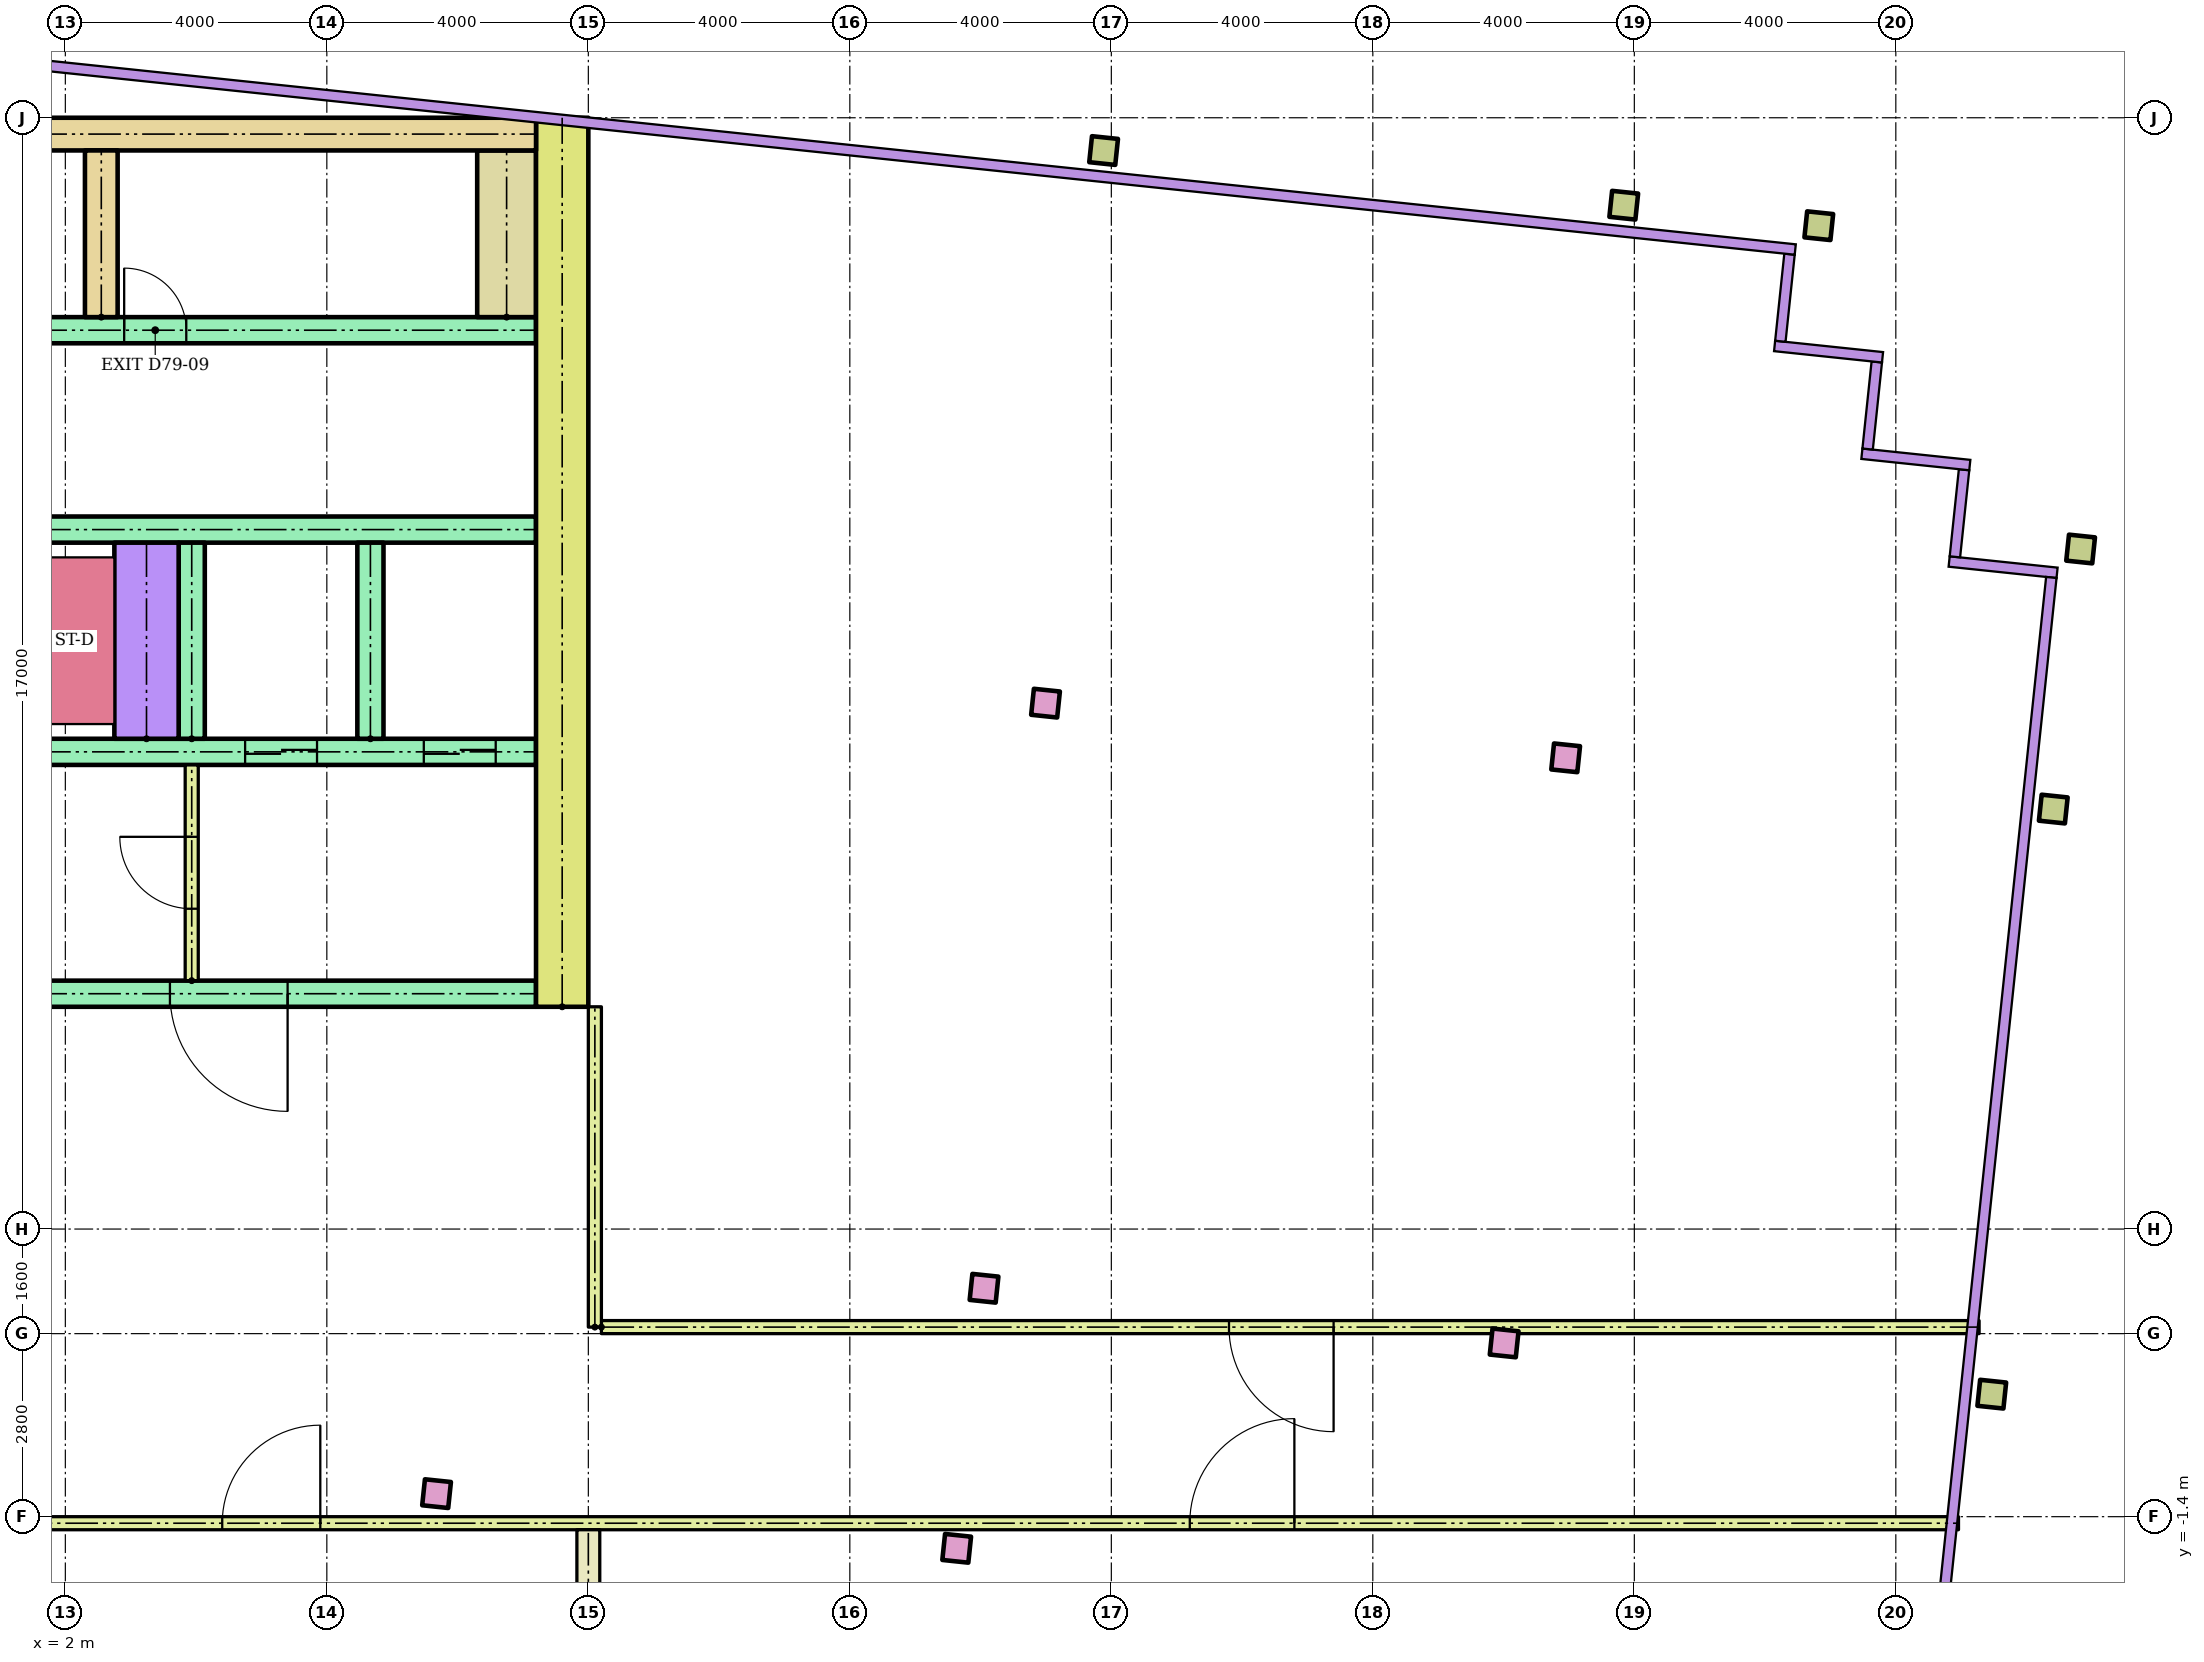
"""IFC4 building model, lengths in metres.
Left out: names, types, materials, properties, quantities, classifications, styles, units other than length and angle.
Written with IfcOpenShell. Run it as: python <this file> out.ifc"""

import sys

from ifc_helpers import new_model, si_unit, direction, frame, frame_2d, origin, origin_2d, place, context, subcontext, project, spatial, rectangle, hollow_rectangle, extrude, element, fill, save


model = new_model("IFC4")
c1 = context("Model", 3, precision=1e-05, world=origin(), true_north=direction((0.0, 1.0)))
c2 = subcontext(c1, "Body", "Model", "MODEL_VIEW")
j1 = project(units=[si_unit("LENGTHUNIT", "METRE"), si_unit("PLANEANGLEUNIT", "RADIAN")], contexts=[c1])
p1 = place(None, origin())
s1 = spatial("IfcSite", under=j1, at=p1, CompositionType="ELEMENT")
p2 = place(p1, origin())
s2 = spatial("IfcBuilding", under=s1, at=p2, CompositionType="ELEMENT")
p3 = place(p2, frame((0.0, 0.0, 309.2)))
s3 = spatial("IfcBuildingStorey", under=s2, at=p3, CompositionType="ELEMENT", Elevation=309.2)
for number, where, z_axis, x_axis in (
    (1, (7.678, -1.048, 0.0), (0.0, 0.0, 1.0), (0.995, -0.105, 0.0)),
    (2, (15.635, -1.884, 0.0), (0.0, 0.0, 1.0), (0.995, -0.105, 0.0)),
    (3, (16.053, 2.094, 0.0), (0.0, 0.0, 1.0), (0.995, -0.105, 0.0)),
    (4, (24.009, 1.258, 0.0), (0.0, 0.0, 1.0), (0.995, -0.105, 0.0)),
):
    element("IfcColumn", number, at=place(p3, frame(where, z_axis=z_axis, x_axis=x_axis)), inside=s3, PredefinedType="COLUMN", context=c2, shape_type="SweptSolid", body=[
        extrude(rectangle(XDim=0.4, YDim=0.4, at=origin_2d()), origin(), (0.0, 0.0, 1.0), 3.78),
    ])
p4 = place(p3, frame((31.468, 0.474, 0.0), z_axis=(0.0, 0.0, 1.0), x_axis=(0.994521895368, -0.104528463268, 0.0)))
e5 = element("IfcColumn", 5, at=p4, inside=s3, PredefinedType="COLUMN", context=c2, shape_type="SweptSolid", body=[
    extrude(hollow_rectangle(XDim=0.4, YDim=0.4, WallThickness=0.02, at=origin_2d()), origin(), (0.0, 0.0, 1.0), 3.78),
])
for number, where, z_axis, x_axis in (
    (6, (16.993, 11.045, 0.0), (0.0, 0.0, 1.0), (0.995, -0.105, 0.0)),
    (7, (24.95, 10.209, 0.0), (0.0, 0.0, 1.0), (0.995, -0.105, 0.0)),
):
    element("IfcColumn", number, at=place(p3, frame(where, z_axis=z_axis, x_axis=x_axis)), inside=s3, PredefinedType="COLUMN", context=c2, shape_type="SweptSolid", body=[
        extrude(rectangle(XDim=0.4, YDim=0.4, at=origin_2d()), origin(), (0.0, 0.0, 1.0), 3.78),
    ])
for number, where, z_axis, x_axis in (
    (8, (32.409, 9.425, 0.0), (0.0, 0.0, 1.0), (0.995, -0.105, 0.0)),
    (9, (32.827, 13.403, 0.0), (0.0, 0.0, 1.0), (0.995, -0.105, 0.0)),
    (10, (17.882, 19.498, 0.0), (0.0, 0.0, 1.0), (0.995, -0.105, 0.0)),
    (11, (25.838, 18.662, 0.0), (0.0, 0.0, 1.0), (0.995, -0.105, 0.0)),
    (12, (28.822, 18.349, 0.0), (0.0, 0.0, 1.0), (0.995, -0.105, 0.0)),
):
    element("IfcColumn", number, at=place(p3, frame(where, z_axis=z_axis, x_axis=x_axis)), inside=s3, PredefinedType="COLUMN", context=c2, shape_type="SweptSolid", body=[
        extrude(hollow_rectangle(XDim=0.4, YDim=0.4, WallThickness=0.02, at=origin_2d()), origin(), (0.0, 0.0, 1.0), 3.78),
    ])
p5 = place(p3, frame((9.6, 6.4, 0.0), z_axis=(0.0, 0.0, 1.0), x_axis=(0.0, 1.0, 0.0)))
e13 = element("IfcWall", 13, at=p5, inside=s3, PredefinedType="SHEAR", context=c2, shape_type="SweptSolid", body=[
    extrude(rectangle(XDim=13.6, YDim=0.8, at=frame_2d((6.8, 0.0))), origin(), (0.0, 0.0, 1.0), 3.78),
])
p6 = place(p3, frame((-9.2, 19.75, 0.0)))
e14 = element("IfcWall", 14, at=p6, inside=s3, PredefinedType="SHEAR", context=c2, shape_type="SweptSolid", body=[
    extrude(rectangle(XDim=18.4, YDim=0.5, at=frame_2d((9.2, 0.0))), origin(), (0.0, 0.0, 1.0), 3.78),
])
p7 = place(p3, frame((-9.2, 6.6, 0.0)))
e15 = element("IfcWall", 15, at=p7, inside=s3, PredefinedType="SHEAR", context=c2, shape_type="SweptSolid", body=[
    extrude(rectangle(XDim=18.4, YDim=0.4, at=frame_2d((9.2, 0.0))), origin(), (0.0, 0.0, 1.0), 3.78),
])
p8 = place(p7, frame((8.3, 0.0, 0.0)))
e16 = element("IfcOpeningElement", 16, at=p8, cuts=e15, PredefinedType="OPENING", context=c2, shape_type="SweptSolid", body=[
    extrude(rectangle(XDim=1.8, YDim=2.1, at=frame_2d((0.9, 1.05))), frame((0.0, 0.21, 0.0), z_axis=(0.0, -1.0, 0.0), x_axis=(1.0, 0.0, 0.0)), (0.0, 0.0, 1.0), 0.42),
])
p9 = place(p7, frame((3.8, 0.0, 0.0)))
e17 = element("IfcOpeningElement", 17, at=p9, cuts=e15, PredefinedType="OPENING", context=c2, shape_type="SweptSolid", body=[
    extrude(rectangle(XDim=1.8, YDim=2.1, at=frame_2d((0.9, 1.05))), frame((0.0, 0.21, 0.0), z_axis=(0.0, -1.0, 0.0), x_axis=(1.0, 0.0, 0.0)), (0.0, 0.0, 1.0), 0.42),
])
p10 = place(p7, frame((12.8, 0.0, 0.0)))
e18 = element("IfcOpeningElement", 18, at=p10, cuts=e15, PredefinedType="OPENING", context=c2, shape_type="SweptSolid", body=[
    extrude(rectangle(XDim=1.8, YDim=2.1, at=frame_2d((0.9, 1.05))), frame((0.0, 0.21, 0.0), z_axis=(0.0, -1.0, 0.0), x_axis=(1.0, 0.0, 0.0)), (0.0, 0.0, 1.0), 0.42),
])
p11 = place(p3, frame((-6.667, 10.3, 0.0)))
e19 = element("IfcWall", 19, at=p11, inside=s3, PredefinedType="SHEAR", context=c2, shape_type="SweptSolid", body=[
    extrude(rectangle(XDim=15.867, YDim=0.4, at=frame_2d((7.933, 0.0))), origin(), (0.0, 0.0, 1.0), 3.78),
])
p12 = place(p11, frame((11.417, 0.0, 0.0)))
e20 = element("IfcOpeningElement", 20, at=p12, cuts=e19, PredefinedType="OPENING", context=c2, shape_type="SweptSolid", body=[
    extrude(rectangle(XDim=1.1, YDim=2.1, at=frame_2d((0.55, 1.05))), frame((0.0, 0.21, 0.0), z_axis=(0.0, -1.0, 0.0), x_axis=(1.0, 0.0, 0.0)), (0.0, 0.0, 1.0), 0.42),
])
p13 = place(p11, frame((14.15, 0.0, 0.0)))
e21 = element("IfcOpeningElement", 21, at=p13, cuts=e19, PredefinedType="OPENING", context=c2, shape_type="SweptSolid", body=[
    extrude(rectangle(XDim=1.1, YDim=2.1, at=frame_2d((0.55, 1.05))), frame((0.0, 0.21, 0.0), z_axis=(0.0, -1.0, 0.0), x_axis=(1.0, 0.0, 0.0)), (0.0, 0.0, 1.0), 0.42),
])
p14 = place(p11, frame((0.867, 0.0, 0.0)))
e22 = element("IfcOpeningElement", 22, at=p14, cuts=e19, PredefinedType="OPENING", context=c2, shape_type="SweptSolid", body=[
    extrude(rectangle(XDim=1.0, YDim=2.1, at=frame_2d((0.5, 1.05))), frame((0.0, 0.21, 0.0), z_axis=(0.0, -1.0, 0.0), x_axis=(1.0, 0.0, 0.0)), (0.0, 0.0, 1.0), 0.42),
])
p15 = place(p11, frame((4.017, 0.0, 0.0)))
e23 = element("IfcOpeningElement", 23, at=p15, cuts=e19, PredefinedType="OPENING", context=c2, shape_type="SweptSolid", body=[
    extrude(rectangle(XDim=0.95, YDim=2.1, at=frame_2d((0.475, 1.05))), frame((0.0, 0.21, 0.0), z_axis=(0.0, -1.0, 0.0), x_axis=(1.0, 0.0, 0.0)), (0.0, 0.0, 1.0), 0.42),
])
p16 = place(p3, frame((-6.667, 13.7, 0.0)))
e24 = element("IfcWall", 24, at=p16, inside=s3, PredefinedType="SHEAR", context=c2, shape_type="SweptSolid", body=[
    extrude(rectangle(XDim=15.867, YDim=0.4, at=frame_2d((7.933, 0.0))), origin(), (0.0, 0.0, 1.0), 3.78),
])
for number, where, z_axis, x_axis in (
    (25, (3.933, 10.5, 0.0), (0.0, 0.0, 1.0), (0.0, 1.0, 0.0)),
    (26, (6.667, 10.5, 0.0), (0.0, 0.0, 1.0), (0.0, 1.0, 0.0)),
):
    element("IfcWall", number, at=place(p3, frame(where, z_axis=z_axis, x_axis=x_axis)), inside=s3, PredefinedType="SHEAR", context=c2, shape_type="SweptSolid", body=[
        extrude(rectangle(XDim=3.0, YDim=0.4, at=frame_2d((1.5, 0.0))), origin(), (0.0, 0.0, 1.0), 3.78),
    ])
p17 = place(p3, frame((3.242, 10.5, 0.0), z_axis=(0.0, 0.0, 1.0), x_axis=(0.0, 1.0, 0.0)))
e27 = element("IfcWall", 27, at=p17, inside=s3, PredefinedType="SHEAR", context=c2, shape_type="SweptSolid", body=[
    extrude(rectangle(XDim=3.0, YDim=0.983, at=frame_2d((1.5, 0.0))), origin(), (0.0, 0.0, 1.0), 3.78),
])
p18 = place(p3, frame((3.933, 6.8, 0.0), z_axis=(0.0, 0.0, 1.0), x_axis=(0.0, 1.0, 0.0)))
e28 = element("IfcWall", 28, at=p18, inside=s3, PredefinedType="PARTITIONING", context=c2, shape_type="SweptSolid", body=[
    extrude(rectangle(XDim=3.3, YDim=0.2, at=frame_2d((1.65, 0.0))), origin(), (0.0, 0.0, 1.0), 3.78),
])
p19 = place(p18, frame((1.1, 0.0, 0.0)))
e29 = element("IfcOpeningElement", 29, at=p19, cuts=e28, PredefinedType="OPENING", context=c2, shape_type="SweptSolid", body=[
    extrude(rectangle(XDim=1.1, YDim=2.1, at=frame_2d((0.55, 1.05))), frame((0.0, 0.11, 0.0), z_axis=(0.0, -1.0, 0.0), x_axis=(1.0, 0.0, 0.0)), (0.0, 0.0, 1.0), 0.22),
])
p20 = place(p3, frame((-9.2, 16.75, 0.0)))
e30 = element("IfcWall", 30, at=p20, inside=s3, PredefinedType="SHEAR", context=c2, shape_type="SweptSolid", body=[
    extrude(rectangle(XDim=18.4, YDim=0.4, at=frame_2d((9.2, 0.0))), origin(), (0.0, 0.0, 1.0), 3.78),
])
p21 = place(p20, frame((0.1, 0.0, 0.0)))
e31 = element("IfcOpeningElement", 31, at=p21, cuts=e30, PredefinedType="OPENING", context=c2, shape_type="SweptSolid", body=[
    extrude(rectangle(XDim=0.95, YDim=2.1, at=frame_2d((0.475, 1.05))), frame((0.0, 0.21, 0.0), z_axis=(0.0, -1.0, 0.0), x_axis=(1.0, 0.0, 0.0)), (0.0, 0.0, 1.0), 0.42),
])
p22 = place(p20, frame((6.1, 0.0, 0.0)))
e32 = element("IfcOpeningElement", 32, at=p22, cuts=e30, PredefinedType="OPENING", context=c2, shape_type="SweptSolid", body=[
    extrude(rectangle(XDim=0.95, YDim=2.1, at=frame_2d((0.475, 1.05))), frame((0.0, 0.21, 0.0), z_axis=(0.0, -1.0, 0.0), x_axis=(1.0, 0.0, 0.0)), (0.0, 0.0, 1.0), 0.42),
])
p23 = place(p20, frame((12.1, 0.0, 0.0)))
e33 = element("IfcOpeningElement", 33, at=p23, cuts=e30, PredefinedType="OPENING", context=c2, shape_type="SweptSolid", body=[
    extrude(rectangle(XDim=0.95, YDim=2.1, at=frame_2d((0.475, 1.05))), frame((0.0, 0.21, 0.0), z_axis=(0.0, -1.0, 0.0), x_axis=(1.0, 0.0, 0.0)), (0.0, 0.0, 1.0), 0.42),
])
p24 = place(p3, frame((2.55, 16.95, 0.0), z_axis=(0.0, 0.0, 1.0), x_axis=(0.0, 1.0, 0.0)))
e34 = element("IfcWall", 34, at=p24, inside=s3, PredefinedType="SHEAR", context=c2, shape_type="SweptSolid", body=[
    extrude(rectangle(XDim=2.55, YDim=0.5, at=frame_2d((1.275, 0.0))), origin(), (0.0, 0.0, 1.0), 3.78),
])
p25 = place(p3, frame((8.75, 16.95, 0.0), z_axis=(0.0, 0.0, 1.0), x_axis=(0.0, 1.0, 0.0)))
e35 = element("IfcWall", 35, at=p25, inside=s3, PredefinedType="SHEAR", context=c2, shape_type="SweptSolid", body=[
    extrude(rectangle(XDim=2.55, YDim=0.9, at=frame_2d((1.275, 0.0))), origin(), (0.0, 0.0, 1.0), 3.78),
])
p26 = place(p3, frame((-17.8, -1.5, 0.0)))
e36 = element("IfcWall", 36, at=p26, inside=s3, PredefinedType="PARTITIONING", context=c2, shape_type="SweptSolid", body=[
    extrude(rectangle(XDim=48.759, YDim=0.2, at=frame_2d((24.379, 0.0))), origin(), (0.0, 0.0, 1.0), 3.78),
])
p27 = place(p26, frame((0.4, 0.0, 0.0)))
e37 = element("IfcOpeningElement", 37, at=p27, cuts=e36, PredefinedType="OPENING", context=c2, shape_type="SweptSolid", body=[
    extrude(rectangle(XDim=1.6, YDim=2.4, at=frame_2d((0.8, 1.2))), frame((0.0, 0.11, 0.0), z_axis=(0.0, -1.0, 0.0), x_axis=(1.0, 0.0, 0.0)), (0.0, 0.0, 1.0), 0.22),
])
p28 = place(p26, frame((12.2, 0.0, 0.0)))
e38 = element("IfcOpeningElement", 38, at=p28, cuts=e36, PredefinedType="OPENING", context=c2, shape_type="SweptSolid", body=[
    extrude(rectangle(XDim=1.5, YDim=2.1, at=frame_2d((0.75, 1.05))), frame((0.0, 0.11, 0.0), z_axis=(0.0, -1.0, 0.0), x_axis=(1.0, 0.0, 0.0)), (0.0, 0.0, 1.0), 0.22),
])
p29 = place(p26, frame((22.2, 0.0, 0.0)))
e39 = element("IfcOpeningElement", 39, at=p29, cuts=e36, PredefinedType="OPENING", context=c2, shape_type="SweptSolid", body=[
    extrude(rectangle(XDim=1.5, YDim=2.1, at=frame_2d((0.75, 1.05))), frame((0.0, 0.11, 0.0), z_axis=(0.0, -1.0, 0.0), x_axis=(1.0, 0.0, 0.0)), (0.0, 0.0, 1.0), 0.22),
])
p30 = place(p26, frame((37.0, 0.0, 0.0)))
e40 = element("IfcOpeningElement", 40, at=p30, cuts=e36, PredefinedType="OPENING", context=c2, shape_type="SweptSolid", body=[
    extrude(rectangle(XDim=1.6, YDim=2.4, at=frame_2d((0.8, 1.2))), frame((0.0, 0.11, 0.0), z_axis=(0.0, -1.0, 0.0), x_axis=(1.0, 0.0, 0.0)), (0.0, 0.0, 1.0), 0.22),
])
p31 = place(p3, frame((10.2, 1.5, 0.0)))
e41 = element("IfcWall", 41, at=p31, inside=s3, PredefinedType="PARTITIONING", context=c2, shape_type="SweptSolid", body=[
    extrude(rectangle(XDim=21.074, YDim=0.2, at=frame_2d((10.537, 0.0))), origin(), (0.0, 0.0, 1.0), 3.78),
])
p32 = place(p31, frame((9.6, 0.0, 0.0)))
e42 = element("IfcOpeningElement", 42, at=p32, cuts=e41, PredefinedType="OPENING", context=c2, shape_type="SweptSolid", body=[
    extrude(rectangle(XDim=1.6, YDim=2.4, at=frame_2d((0.8, 1.2))), frame((0.0, 0.11, 0.0), z_axis=(0.0, -1.0, 0.0), x_axis=(1.0, 0.0, 0.0)), (0.0, 0.0, 1.0), 0.22),
])
p33 = place(p3, frame((10.1, 1.5, 0.0), z_axis=(0.0, 0.0, 1.0), x_axis=(0.0, 1.0, 0.0)))
e43 = element("IfcWall", 43, at=p33, inside=s3, PredefinedType="PARTITIONING", context=c2, shape_type="SweptSolid", body=[
    extrude(rectangle(XDim=4.9, YDim=0.2, at=frame_2d((2.45, 0.0))), origin(), (0.0, 0.0, 1.0), 3.78),
])
p34 = place(p3, frame((10.0, -16.173, 0.0), z_axis=(0.0, 0.0, 1.0), x_axis=(0.0, 1.0, 0.0)))
e44 = element("IfcWall", 44, at=p34, inside=s3, PredefinedType="PARTITIONING", context=c2, shape_type="SweptSolid", body=[
    extrude(rectangle(XDim=14.573, YDim=0.35, at=frame_2d((7.287, 0.0))), origin(), (0.0, 0.0, 1.0), 3.78),
])
p35 = place(p10, frame((1.8, 0.0, 0.0), z_axis=(0.0, 0.0, 1.0), x_axis=(-1.0, 0.0, 0.0)))
e45 = element("IfcDoor", 45, at=p35, inside=s3, OperationType="DOUBLE_DOOR_SINGLE_SWING", PredefinedType="DOOR", context=c2, shape_type="SweptSolid", body=[
    extrude(rectangle(XDim=1.8, YDim=2.1, at=frame_2d((0.9, 1.05))), frame((0.0, 0.025, 0.0), z_axis=(0.0, -1.0, 0.0), x_axis=(1.0, 0.0, 0.0)), (0.0, 0.0, 1.0), 0.05),
])
fill(e18, e45)
p36 = place(p12, origin())
e46 = element("IfcDoor", 46, at=p36, inside=s3, OperationType="SLIDING_TO_LEFT", PredefinedType="DOOR", context=c2, shape_type="SweptSolid", body=[
    extrude(rectangle(XDim=1.1, YDim=2.1, at=frame_2d((0.55, 1.05))), frame((0.0, 0.025, 0.0), z_axis=(0.0, -1.0, 0.0), x_axis=(1.0, 0.0, 0.0)), (0.0, 0.0, 1.0), 0.05),
])
fill(e20, e46)
p37 = place(p13, origin())
e47 = element("IfcDoor", 47, at=p37, inside=s3, OperationType="SLIDING_TO_LEFT", PredefinedType="DOOR", context=c2, shape_type="SweptSolid", body=[
    extrude(rectangle(XDim=1.1, YDim=2.1, at=frame_2d((0.55, 1.05))), frame((0.0, 0.025, 0.0), z_axis=(0.0, -1.0, 0.0), x_axis=(1.0, 0.0, 0.0)), (0.0, 0.0, 1.0), 0.05),
])
fill(e21, e47)
p38 = place(p19, origin())
e48 = element("IfcDoor", 48, at=p38, inside=s3, OperationType="SINGLE_SWING_RIGHT", PredefinedType="DOOR", context=c2, shape_type="SweptSolid", body=[
    extrude(rectangle(XDim=1.1, YDim=2.1, at=frame_2d((0.55, 1.05))), frame((0.0, 0.025, 0.0), z_axis=(0.0, -1.0, 0.0), x_axis=(1.0, 0.0, 0.0)), (0.0, 0.0, 1.0), 0.05),
])
fill(e29, e48)
p39 = place(p23, origin())
e49 = element("IfcDoor", 49, at=p39, inside=s3, OperationType="SINGLE_SWING_LEFT", PredefinedType="DOOR", context=c2, shape_type="SweptSolid", body=[
    extrude(rectangle(XDim=0.95, YDim=2.1, at=frame_2d((0.475, 1.05))), frame((0.0, 0.025, 0.0), z_axis=(0.0, -1.0, 0.0), x_axis=(1.0, 0.0, 0.0)), (0.0, 0.0, 1.0), 0.05),
])
fill(e33, e49)
p40 = place(p29, origin())
e50 = element("IfcDoor", 50, at=p40, inside=s3, OperationType="DOUBLE_DOOR_SINGLE_SWING", PredefinedType="DOOR", context=c2, shape_type="SweptSolid", body=[
    extrude(rectangle(XDim=1.5, YDim=2.1, at=frame_2d((0.75, 1.05))), frame((0.0, 0.025, 0.0), z_axis=(0.0, -1.0, 0.0), x_axis=(1.0, 0.0, 0.0)), (0.0, 0.0, 1.0), 0.05),
])
fill(e39, e50)
p41 = place(p30, origin())
e51 = element("IfcDoor", 51, at=p41, inside=s3, OperationType="DOUBLE_DOOR_SINGLE_SWING", PredefinedType="DOOR", context=c2, shape_type="SweptSolid", body=[
    extrude(rectangle(XDim=1.6, YDim=2.4, at=frame_2d((0.8, 1.2))), frame((0.0, 0.025, 0.0), z_axis=(0.0, -1.0, 0.0), x_axis=(1.0, 0.0, 0.0)), (0.0, 0.0, 1.0), 0.05),
])
fill(e40, e51)
p42 = place(p32, frame((1.6, 0.0, 0.0), z_axis=(0.0, 0.0, 1.0), x_axis=(-1.0, 0.0, 0.0)))
e52 = element("IfcDoor", 52, at=p42, inside=s3, OperationType="DOUBLE_DOOR_SINGLE_SWING", PredefinedType="DOOR", context=c2, shape_type="SweptSolid", body=[
    extrude(rectangle(XDim=1.6, YDim=2.4, at=frame_2d((0.8, 1.2))), frame((0.0, 0.025, 0.0), z_axis=(0.0, -1.0, 0.0), x_axis=(1.0, 0.0, 0.0)), (0.0, 0.0, 1.0), 0.05),
])
fill(e42, e52)
save(model, sys.argv[1])
